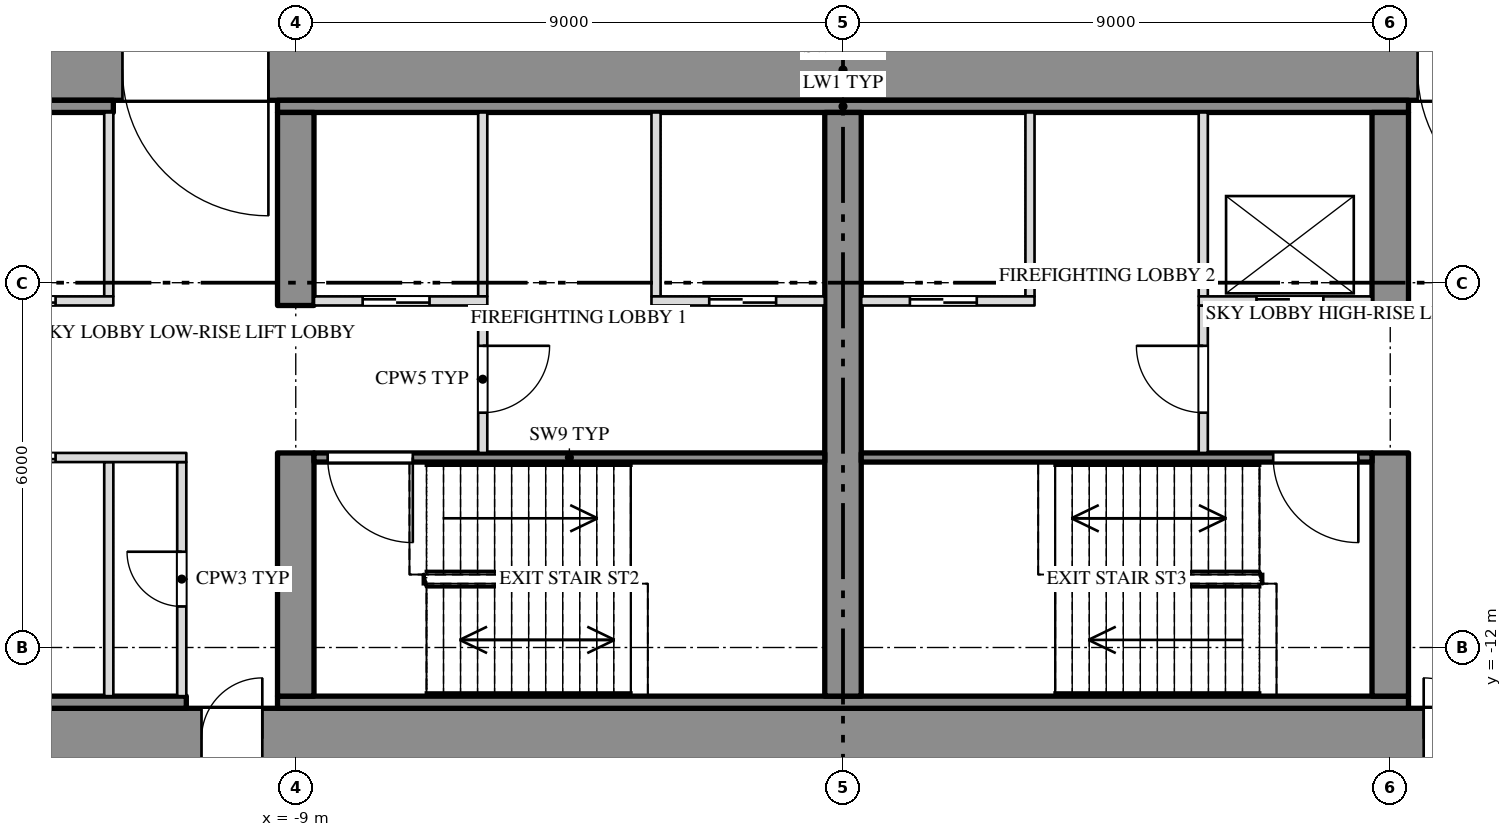
"""IFC4 building model, lengths in metres.
Left out: names, types, materials, properties, quantities, classifications, styles, units other than length and angle.
Written with IfcOpenShell. Run it as: python <this file> out.ifc"""

import sys

from ifc_helpers import new_model, si_unit, direction, frame, frame_2d, origin, place, context, subcontext, project, spatial, rectangle, extrude, element, fill, save


model = new_model("IFC4")
c1 = context("Model", 3, precision=1e-05, world=origin(), true_north=direction((0.0, 1.0)))
c2 = subcontext(c1, "Body", "Model", "MODEL_VIEW")
j1 = project(units=[si_unit("LENGTHUNIT", "METRE"), si_unit("PLANEANGLEUNIT", "RADIAN")], contexts=[c1])
p1 = place(None, origin())
s1 = spatial("IfcSite", under=j1, at=p1, CompositionType="ELEMENT")
p2 = place(p1, origin())
s2 = spatial("IfcBuilding", under=s1, at=p2, CompositionType="ELEMENT")
p3 = place(p2, frame((0.0, 0.0, 156.5)))
s3 = spatial("IfcBuildingStorey", under=s2, at=p3, CompositionType="ELEMENT", Elevation=156.5)
p4 = place(p3, frame((-27.0, -2.5, 0.0), z_axis=(0.0, 0.0, 1.0), x_axis=(1.0, 0.0, 0.0)))
e1 = element("IfcWall", 1, at=p4, inside=s3, PredefinedType="SHEAR", context=c2, shape_type="SweptSolid", body=[
    extrude(rectangle(XDim=54.0, YDim=1.0, at=frame_2d((27.0, 0.0))), origin(), (0.0, 0.0, 1.0), 3.65),
])
p5 = place(p4, frame((15.15, 0.0, 0.0)))
e2 = element("IfcOpeningElement", 2, at=p5, cuts=e1, PredefinedType="OPENING", context=c2, shape_type="SweptSolid", body=[
    extrude(rectangle(XDim=2.4, YDim=2.1, at=frame_2d((1.2, 1.05))), frame((0.0, 0.512, 0.0), z_axis=(0.0, -1.0, 0.0), x_axis=(1.0, 0.0, 0.0)), (0.0, 0.0, 1.0), 1.024),
])
p6 = place(p4, frame((36.45, 0.0, 0.0)))
e3 = element("IfcOpeningElement", 3, at=p6, cuts=e1, PredefinedType="OPENING", context=c2, shape_type="SweptSolid", body=[
    extrude(rectangle(XDim=2.4, YDim=2.1, at=frame_2d((1.2, 1.05))), frame((0.0, 0.512, 0.0), z_axis=(0.0, -1.0, 0.0), x_axis=(1.0, 0.0, 0.0)), (0.0, 0.0, 1.0), 1.024),
])
p7 = place(p3, frame((-27.0, -13.5, 0.0), z_axis=(0.0, 0.0, 1.0), x_axis=(1.0, 0.0, 0.0)))
e4 = element("IfcWall", 4, at=p7, inside=s3, PredefinedType="SHEAR", context=c2, shape_type="SweptSolid", body=[
    extrude(rectangle(XDim=54.0, YDim=1.0, at=frame_2d((27.0, 0.0))), origin(), (0.0, 0.0, 1.0), 3.65),
])
p8 = place(p7, frame((16.45, 0.0, 0.0)))
e5 = element("IfcOpeningElement", 5, at=p8, cuts=e4, PredefinedType="OPENING", context=c2, shape_type="SweptSolid", body=[
    extrude(rectangle(XDim=1.0, YDim=2.1, at=frame_2d((0.5, 1.05))), frame((0.0, 0.512, 0.0), z_axis=(0.0, -1.0, 0.0), x_axis=(1.0, 0.0, 0.0)), (0.0, 0.0, 1.0), 1.024),
])
p9 = place(p7, frame((36.55, 0.0, 0.0)))
e6 = element("IfcOpeningElement", 6, at=p9, cuts=e4, PredefinedType="OPENING", context=c2, shape_type="SweptSolid", body=[
    extrude(rectangle(XDim=1.0, YDim=2.1, at=frame_2d((0.5, 1.05))), frame((0.0, 0.512, 0.0), z_axis=(0.0, -1.0, 0.0), x_axis=(1.0, 0.0, 0.0)), (0.0, 0.0, 1.0), 1.024),
])
p10 = place(p3, frame((-26.0, -3.1, 0.0), z_axis=(0.0, 0.0, 1.0), x_axis=(1.0, 0.0, 0.0)))
e7 = element("IfcWall", 7, at=p10, inside=s3, PredefinedType="SHEAR", context=c2, shape_type="SweptSolid", body=[
    extrude(rectangle(XDim=14.0, YDim=0.2, at=frame_2d((7.0, 0.0))), origin(), (0.0, 0.0, 1.0), 3.65),
])
p11 = place(p3, frame((-9.3, -3.1, 0.0), z_axis=(0.0, 0.0, 1.0), x_axis=(1.0, 0.0, 0.0)))
e8 = element("IfcWall", 8, at=p11, inside=s3, PredefinedType="SHEAR", context=c2, shape_type="SweptSolid", body=[
    extrude(rectangle(XDim=18.6, YDim=0.2, at=frame_2d((9.3, 0.0))), origin(), (0.0, 0.0, 1.0), 3.65),
])
p12 = place(p3, frame((-26.0, -12.9, 0.0), z_axis=(0.0, 0.0, 1.0), x_axis=(1.0, 0.0, 0.0)))
e9 = element("IfcWall", 9, at=p12, inside=s3, PredefinedType="SHEAR", context=c2, shape_type="SweptSolid", body=[
    extrude(rectangle(XDim=15.2, YDim=0.2, at=frame_2d((7.6, 0.0))), origin(), (0.0, 0.0, 1.0), 3.65),
])
p13 = place(p3, frame((-9.3, -12.9, 0.0), z_axis=(0.0, 0.0, 1.0), x_axis=(1.0, 0.0, 0.0)))
e10 = element("IfcWall", 10, at=p13, inside=s3, PredefinedType="SHEAR", context=c2, shape_type="SweptSolid", body=[
    extrude(rectangle(XDim=18.6, YDim=0.2, at=frame_2d((9.3, 0.0))), origin(), (0.0, 0.0, 1.0), 3.65),
])
p14 = place(p3, frame((-9.0, -12.8, 0.0), z_axis=(0.0, 0.0, 1.0), x_axis=(0.0, 1.0, 0.0)))
e11 = element("IfcWall", 11, at=p14, inside=s3, PredefinedType="SHEAR", context=c2, shape_type="SweptSolid", body=[
    extrude(rectangle(XDim=4.0, YDim=0.6, at=frame_2d((2.0, 0.0))), origin(), (0.0, 0.0, 1.0), 3.65),
])
p15 = place(p3, frame((-9.0, -6.375, 0.0), z_axis=(0.0, 0.0, 1.0), x_axis=(0.0, 1.0, 0.0)))
e12 = element("IfcWall", 12, at=p15, inside=s3, PredefinedType="SHEAR", context=c2, shape_type="SweptSolid", body=[
    extrude(rectangle(XDim=3.175, YDim=0.6, at=frame_2d((1.587, 0.0))), origin(), (0.0, 0.0, 1.0), 3.65),
])
p16 = place(p3, frame((0.0, -12.8, 0.0), z_axis=(0.0, 0.0, 1.0), x_axis=(0.0, 1.0, 0.0)))
e13 = element("IfcWall", 13, at=p16, inside=s3, PredefinedType="SHEAR", context=c2, shape_type="SweptSolid", body=[
    extrude(rectangle(XDim=9.6, YDim=0.6, at=frame_2d((4.8, 0.0))), origin(), (0.0, 0.0, 1.0), 3.65),
])
p17 = place(p3, frame((9.0, -12.8, 0.0), z_axis=(0.0, 0.0, 1.0), x_axis=(0.0, 1.0, 0.0)))
e14 = element("IfcWall", 14, at=p17, inside=s3, PredefinedType="SHEAR", context=c2, shape_type="SweptSolid", body=[
    extrude(rectangle(XDim=4.0, YDim=0.6, at=frame_2d((2.0, 0.0))), origin(), (0.0, 0.0, 1.0), 3.65),
])
p18 = place(p3, frame((9.0, -6.375, 0.0), z_axis=(0.0, 0.0, 1.0), x_axis=(0.0, 1.0, 0.0)))
e15 = element("IfcWall", 15, at=p18, inside=s3, PredefinedType="SHEAR", context=c2, shape_type="SweptSolid", body=[
    extrude(rectangle(XDim=3.175, YDim=0.6, at=frame_2d((1.587, 0.0))), origin(), (0.0, 0.0, 1.0), 3.65),
])
for number, where, z_axis, x_axis in (
    (16, (-12.075, -6.225, 0.0), (0.0, 0.0, 1.0), (0.0, 1.0, 0.0)),
    (17, (-3.075, -6.225, 0.0), (0.0, 0.0, 1.0), (0.0, 1.0, 0.0)),
    (18, (-5.925, -6.225, 0.0), (0.0, 0.0, 1.0), (0.0, 1.0, 0.0)),
    (19, (3.075, -6.225, 0.0), (0.0, 0.0, 1.0), (0.0, 1.0, 0.0)),
    (20, (5.925, -6.225, 0.0), (0.0, 0.0, 1.0), (0.0, 1.0, 0.0)),
):
    element("IfcWall", number, at=place(p3, frame(where, z_axis=z_axis, x_axis=x_axis)), inside=s3, PredefinedType="PARTITIONING", context=c2, shape_type="SweptSolid", body=[
        extrude(rectangle(XDim=3.025, YDim=0.15, at=frame_2d((1.513, 0.0))), origin(), (0.0, 0.0, 1.0), 3.65),
    ])
p19 = place(p3, frame((-10.875, -12.8, 0.0), z_axis=(0.0, 0.0, 1.0), x_axis=(0.0, 1.0, 0.0)))
e21 = element("IfcWall", 21, at=p19, inside=s3, PredefinedType="PARTITIONING", context=c2, shape_type="SweptSolid", body=[
    extrude(rectangle(XDim=3.85, YDim=0.15, at=frame_2d((1.925, 0.0))), origin(), (0.0, 0.0, 1.0), 3.65),
])
p20 = place(p19, frame((1.475, 0.0, 0.0)))
e22 = element("IfcOpeningElement", 22, at=p20, cuts=e21, PredefinedType="OPENING", context=c2, shape_type="SweptSolid", body=[
    extrude(rectangle(XDim=0.9, YDim=2.1, at=frame_2d((0.45, 1.05))), frame((0.0, 0.087, 0.0), z_axis=(0.0, -1.0, 0.0), x_axis=(1.0, 0.0, 0.0)), (0.0, 0.0, 1.0), 0.174),
])
p21 = place(p3, frame((-12.075, -12.8, 0.0), z_axis=(0.0, 0.0, 1.0), x_axis=(0.0, 1.0, 0.0)))
e23 = element("IfcWall", 23, at=p21, inside=s3, PredefinedType="PARTITIONING", context=c2, shape_type="SweptSolid", body=[
    extrude(rectangle(XDim=3.85, YDim=0.15, at=frame_2d((1.925, 0.0))), origin(), (0.0, 0.0, 1.0), 3.65),
])
p22 = place(p3, frame((-5.925, -8.8, 0.0), z_axis=(0.0, 0.0, 1.0), x_axis=(0.0, 1.0, 0.0)))
e24 = element("IfcWall", 24, at=p22, inside=s3, PredefinedType="PARTITIONING", context=c2, shape_type="SweptSolid", body=[
    extrude(rectangle(XDim=2.425, YDim=0.15, at=frame_2d((1.212, 0.0))), origin(), (0.0, 0.0, 1.0), 3.65),
])
p23 = place(p22, frame((0.662, 0.0, 0.0)))
e25 = element("IfcOpeningElement", 25, at=p23, cuts=e24, PredefinedType="OPENING", context=c2, shape_type="SweptSolid", body=[
    extrude(rectangle(XDim=1.1, YDim=2.1, at=frame_2d((0.55, 1.05))), frame((0.0, 0.087, 0.0), z_axis=(0.0, -1.0, 0.0), x_axis=(1.0, 0.0, 0.0)), (0.0, 0.0, 1.0), 0.174),
])
p24 = place(p3, frame((5.925, -8.8, 0.0), z_axis=(0.0, 0.0, 1.0), x_axis=(0.0, 1.0, 0.0)))
e26 = element("IfcWall", 26, at=p24, inside=s3, PredefinedType="PARTITIONING", context=c2, shape_type="SweptSolid", body=[
    extrude(rectangle(XDim=2.425, YDim=0.15, at=frame_2d((1.212, 0.0))), origin(), (0.0, 0.0, 1.0), 3.65),
])
p25 = place(p24, frame((0.662, 0.0, 0.0)))
e27 = element("IfcOpeningElement", 27, at=p25, cuts=e26, PredefinedType="OPENING", context=c2, shape_type="SweptSolid", body=[
    extrude(rectangle(XDim=1.1, YDim=2.1, at=frame_2d((0.55, 1.05))), frame((0.0, 0.087, 0.0), z_axis=(0.0, -1.0, 0.0), x_axis=(1.0, 0.0, 0.0)), (0.0, 0.0, 1.0), 0.174),
])
p26 = place(p3, frame((-17.7, -6.3, 0.0), z_axis=(0.0, 0.0, 1.0), x_axis=(1.0, 0.0, 0.0)))
e28 = element("IfcWall", 28, at=p26, inside=s3, PredefinedType="PARTITIONING", context=c2, shape_type="SweptSolid", body=[
    extrude(rectangle(XDim=5.7, YDim=0.15, at=frame_2d((2.85, 0.0))), origin(), (0.0, 0.0, 1.0), 3.65),
])
p27 = place(p26, frame((0.8, 0.0, 0.0)))
e29 = element("IfcOpeningElement", 29, at=p27, cuts=e28, PredefinedType="OPENING", context=c2, shape_type="SweptSolid", body=[
    extrude(rectangle(XDim=1.1, YDim=2.1, at=frame_2d((0.55, 1.05))), frame((0.0, 0.087, 0.0), z_axis=(0.0, -1.0, 0.0), x_axis=(1.0, 0.0, 0.0)), (0.0, 0.0, 1.0), 0.174),
])
p28 = place(p26, frame((3.65, 0.0, 0.0)))
e30 = element("IfcOpeningElement", 30, at=p28, cuts=e28, PredefinedType="OPENING", context=c2, shape_type="SweptSolid", body=[
    extrude(rectangle(XDim=1.1, YDim=2.1, at=frame_2d((0.55, 1.05))), frame((0.0, 0.087, 0.0), z_axis=(0.0, -1.0, 0.0), x_axis=(1.0, 0.0, 0.0)), (0.0, 0.0, 1.0), 0.174),
])
p29 = place(p3, frame((-8.7, -6.3, 0.0), z_axis=(0.0, 0.0, 1.0), x_axis=(1.0, 0.0, 0.0)))
e31 = element("IfcWall", 31, at=p29, inside=s3, PredefinedType="PARTITIONING", context=c2, shape_type="SweptSolid", body=[
    extrude(rectangle(XDim=2.85, YDim=0.15, at=frame_2d((1.425, 0.0))), origin(), (0.0, 0.0, 1.0), 3.65),
])
p30 = place(p29, frame((0.8, 0.0, 0.0)))
e32 = element("IfcOpeningElement", 32, at=p30, cuts=e31, PredefinedType="OPENING", context=c2, shape_type="SweptSolid", body=[
    extrude(rectangle(XDim=1.1, YDim=2.1, at=frame_2d((0.55, 1.05))), frame((0.0, 0.087, 0.0), z_axis=(0.0, -1.0, 0.0), x_axis=(1.0, 0.0, 0.0)), (0.0, 0.0, 1.0), 0.174),
])
p31 = place(p3, frame((-3.15, -6.3, 0.0), z_axis=(0.0, 0.0, 1.0), x_axis=(1.0, 0.0, 0.0)))
e33 = element("IfcWall", 33, at=p31, inside=s3, PredefinedType="PARTITIONING", context=c2, shape_type="SweptSolid", body=[
    extrude(rectangle(XDim=2.85, YDim=0.15, at=frame_2d((1.425, 0.0))), origin(), (0.0, 0.0, 1.0), 3.65),
])
p32 = place(p31, frame((0.95, 0.0, 0.0)))
e34 = element("IfcOpeningElement", 34, at=p32, cuts=e33, PredefinedType="OPENING", context=c2, shape_type="SweptSolid", body=[
    extrude(rectangle(XDim=1.1, YDim=2.1, at=frame_2d((0.55, 1.05))), frame((0.0, 0.087, 0.0), z_axis=(0.0, -1.0, 0.0), x_axis=(1.0, 0.0, 0.0)), (0.0, 0.0, 1.0), 0.174),
])
p33 = place(p3, frame((0.3, -6.3, 0.0), z_axis=(0.0, 0.0, 1.0), x_axis=(1.0, 0.0, 0.0)))
e35 = element("IfcWall", 35, at=p33, inside=s3, PredefinedType="PARTITIONING", context=c2, shape_type="SweptSolid", body=[
    extrude(rectangle(XDim=2.85, YDim=0.15, at=frame_2d((1.425, 0.0))), origin(), (0.0, 0.0, 1.0), 3.65),
])
p34 = place(p33, frame((0.8, 0.0, 0.0)))
e36 = element("IfcOpeningElement", 36, at=p34, cuts=e35, PredefinedType="OPENING", context=c2, shape_type="SweptSolid", body=[
    extrude(rectangle(XDim=1.1, YDim=2.1, at=frame_2d((0.55, 1.05))), frame((0.0, 0.087, 0.0), z_axis=(0.0, -1.0, 0.0), x_axis=(1.0, 0.0, 0.0)), (0.0, 0.0, 1.0), 0.174),
])
p35 = place(p3, frame((5.85, -6.3, 0.0), z_axis=(0.0, 0.0, 1.0), x_axis=(1.0, 0.0, 0.0)))
e37 = element("IfcWall", 37, at=p35, inside=s3, PredefinedType="PARTITIONING", context=c2, shape_type="SweptSolid", body=[
    extrude(rectangle(XDim=2.85, YDim=0.15, at=frame_2d((1.425, 0.0))), origin(), (0.0, 0.0, 1.0), 3.65),
])
p36 = place(p35, frame((0.95, 0.0, 0.0)))
e38 = element("IfcOpeningElement", 38, at=p36, cuts=e37, PredefinedType="OPENING", context=c2, shape_type="SweptSolid", body=[
    extrude(rectangle(XDim=1.1, YDim=2.1, at=frame_2d((0.55, 1.05))), frame((0.0, 0.087, 0.0), z_axis=(0.0, -1.0, 0.0), x_axis=(1.0, 0.0, 0.0)), (0.0, 0.0, 1.0), 0.174),
])
p37 = place(p3, frame((-17.7, -8.875, 0.0), z_axis=(0.0, 0.0, 1.0), x_axis=(1.0, 0.0, 0.0)))
e39 = element("IfcWall", 39, at=p37, inside=s3, PredefinedType="PARTITIONING", context=c2, shape_type="SweptSolid", body=[
    extrude(rectangle(XDim=6.9, YDim=0.15, at=frame_2d((3.45, 0.0))), origin(), (0.0, 0.0, 1.0), 3.65),
])
p38 = place(p37, frame((0.8, 0.0, 0.0)))
e40 = element("IfcOpeningElement", 40, at=p38, cuts=e39, PredefinedType="OPENING", context=c2, shape_type="SweptSolid", body=[
    extrude(rectangle(XDim=1.1, YDim=2.1, at=frame_2d((0.55, 1.05))), frame((0.0, 0.087, 0.0), z_axis=(0.0, -1.0, 0.0), x_axis=(1.0, 0.0, 0.0)), (0.0, 0.0, 1.0), 0.174),
])
p39 = place(p37, frame((3.65, 0.0, 0.0)))
e41 = element("IfcOpeningElement", 41, at=p39, cuts=e39, PredefinedType="OPENING", context=c2, shape_type="SweptSolid", body=[
    extrude(rectangle(XDim=1.1, YDim=2.1, at=frame_2d((0.55, 1.05))), frame((0.0, 0.087, 0.0), z_axis=(0.0, -1.0, 0.0), x_axis=(1.0, 0.0, 0.0)), (0.0, 0.0, 1.0), 0.174),
])
p40 = place(p3, frame((-8.7, -8.875, 0.0), z_axis=(0.0, 0.0, 1.0), x_axis=(1.0, 0.0, 0.0)))
e42 = element("IfcWall", 42, at=p40, inside=s3, PredefinedType="SHEAR", context=c2, shape_type="SweptSolid", body=[
    extrude(rectangle(XDim=8.4, YDim=0.15, at=frame_2d((4.2, 0.0))), origin(), (0.0, 0.0, 1.0), 3.65),
])
p41 = place(p40, frame((0.225, 0.0, 0.0)))
e43 = element("IfcOpeningElement", 43, at=p41, cuts=e42, PredefinedType="OPENING", context=c2, shape_type="SweptSolid", body=[
    extrude(rectangle(XDim=1.4, YDim=2.1, at=frame_2d((0.7, 1.05))), frame((0.0, 0.087, 0.0), z_axis=(0.0, -1.0, 0.0), x_axis=(1.0, 0.0, 0.0)), (0.0, 0.0, 1.0), 0.174),
])
p42 = place(p3, frame((0.3, -8.875, 0.0), z_axis=(0.0, 0.0, 1.0), x_axis=(1.0, 0.0, 0.0)))
e44 = element("IfcWall", 44, at=p42, inside=s3, PredefinedType="SHEAR", context=c2, shape_type="SweptSolid", body=[
    extrude(rectangle(XDim=8.4, YDim=0.15, at=frame_2d((4.2, 0.0))), origin(), (0.0, 0.0, 1.0), 3.65),
])
p43 = place(p42, frame((6.775, 0.0, 0.0)))
e45 = element("IfcOpeningElement", 45, at=p43, cuts=e44, PredefinedType="OPENING", context=c2, shape_type="SweptSolid", body=[
    extrude(rectangle(XDim=1.4, YDim=2.1, at=frame_2d((0.7, 1.05))), frame((0.0, 0.087, 0.0), z_axis=(0.0, -1.0, 0.0), x_axis=(1.0, 0.0, 0.0)), (0.0, 0.0, 1.0), 0.174),
])
p44 = place(p39, origin())
e46 = element("IfcDoor", 46, at=p44, inside=s3, OperationType="SLIDING_TO_RIGHT", PredefinedType="DOOR", context=c2, shape_type="SweptSolid", body=[
    extrude(rectangle(XDim=1.1, YDim=2.1, at=frame_2d((0.55, 1.05))), frame((0.0, 0.025, 0.0), z_axis=(0.0, -1.0, 0.0), x_axis=(1.0, 0.0, 0.0)), (0.0, 0.0, 1.0), 0.05),
])
fill(e41, e46)
p45 = place(p28, origin())
e47 = element("IfcDoor", 47, at=p45, inside=s3, OperationType="SLIDING_TO_LEFT", PredefinedType="DOOR", context=c2, shape_type="SweptSolid", body=[
    extrude(rectangle(XDim=1.1, YDim=2.1, at=frame_2d((0.55, 1.05))), frame((0.0, 0.025, 0.0), z_axis=(0.0, -1.0, 0.0), x_axis=(1.0, 0.0, 0.0)), (0.0, 0.0, 1.0), 0.05),
])
fill(e30, e47)
p46 = place(p20, origin())
e48 = element("IfcDoor", 48, at=p46, inside=s3, OperationType="SINGLE_SWING_RIGHT", PredefinedType="DOOR", context=c2, shape_type="SweptSolid", body=[
    extrude(rectangle(XDim=0.9, YDim=2.1, at=frame_2d((0.45, 1.05))), frame((0.0, 0.025, 0.0), z_axis=(0.0, -1.0, 0.0), x_axis=(1.0, 0.0, 0.0)), (0.0, 0.0, 1.0), 0.05),
])
fill(e22, e48)
p47 = place(p5, origin())
e49 = element("IfcDoor", 49, at=p47, inside=s3, OperationType="DOUBLE_DOOR_SINGLE_SWING", PredefinedType="DOOR", context=c2, shape_type="SweptSolid", body=[
    extrude(rectangle(XDim=2.4, YDim=2.1, at=frame_2d((1.2, 1.05))), frame((0.0, 0.025, 0.0), z_axis=(0.0, -1.0, 0.0), x_axis=(1.0, 0.0, 0.0)), (0.0, 0.0, 1.0), 0.05),
])
fill(e2, e49)
p48 = place(p8, origin())
e50 = element("IfcDoor", 50, at=p48, inside=s3, OperationType="SINGLE_SWING_RIGHT", PredefinedType="DOOR", context=c2, shape_type="SweptSolid", body=[
    extrude(rectangle(XDim=1.0, YDim=2.1, at=frame_2d((0.5, 1.05))), frame((0.0, 0.025, 0.0), z_axis=(0.0, -1.0, 0.0), x_axis=(1.0, 0.0, 0.0)), (0.0, 0.0, 1.0), 0.05),
])
fill(e5, e50)
p49 = place(p41, origin())
e51 = element("IfcDoor", 51, at=p49, inside=s3, OperationType="DOUBLE_DOOR_SINGLE_SWING", PredefinedType="DOOR", context=c2, shape_type="SweptSolid", body=[
    extrude(rectangle(XDim=1.4, YDim=2.1, at=frame_2d((0.7, 1.05))), frame((0.0, 0.025, 0.0), z_axis=(0.0, -1.0, 0.0), x_axis=(1.0, 0.0, 0.0)), (0.0, 0.0, 1.0), 0.05),
])
fill(e43, e51)
p50 = place(p30, origin())
e52 = element("IfcDoor", 52, at=p50, inside=s3, OperationType="SLIDING_TO_RIGHT", PredefinedType="DOOR", context=c2, shape_type="SweptSolid", body=[
    extrude(rectangle(XDim=1.1, YDim=2.1, at=frame_2d((0.55, 1.05))), frame((0.0, 0.025, 0.0), z_axis=(0.0, -1.0, 0.0), x_axis=(1.0, 0.0, 0.0)), (0.0, 0.0, 1.0), 0.05),
])
fill(e32, e52)
p51 = place(p23, origin())
e53 = element("IfcDoor", 53, at=p51, inside=s3, OperationType="SINGLE_SWING_LEFT", PredefinedType="DOOR", context=c2, shape_type="SweptSolid", body=[
    extrude(rectangle(XDim=1.1, YDim=2.1, at=frame_2d((0.55, 1.05))), frame((0.0, 0.025, 0.0), z_axis=(0.0, -1.0, 0.0), x_axis=(1.0, 0.0, 0.0)), (0.0, 0.0, 1.0), 0.05),
])
fill(e25, e53)
p52 = place(p32, origin())
e54 = element("IfcDoor", 54, at=p52, inside=s3, OperationType="SLIDING_TO_RIGHT", PredefinedType="DOOR", context=c2, shape_type="SweptSolid", body=[
    extrude(rectangle(XDim=1.1, YDim=2.1, at=frame_2d((0.55, 1.05))), frame((0.0, 0.025, 0.0), z_axis=(0.0, -1.0, 0.0), x_axis=(1.0, 0.0, 0.0)), (0.0, 0.0, 1.0), 0.05),
])
fill(e34, e54)
p53 = place(p34, origin())
e55 = element("IfcDoor", 55, at=p53, inside=s3, OperationType="SLIDING_TO_LEFT", PredefinedType="DOOR", context=c2, shape_type="SweptSolid", body=[
    extrude(rectangle(XDim=1.1, YDim=2.1, at=frame_2d((0.55, 1.05))), frame((0.0, 0.025, 0.0), z_axis=(0.0, -1.0, 0.0), x_axis=(1.0, 0.0, 0.0)), (0.0, 0.0, 1.0), 0.05),
])
fill(e36, e55)
p54 = place(p25, origin())
e56 = element("IfcDoor", 56, at=p54, inside=s3, OperationType="SINGLE_SWING_RIGHT", PredefinedType="DOOR", context=c2, shape_type="SweptSolid", body=[
    extrude(rectangle(XDim=1.1, YDim=2.1, at=frame_2d((0.55, 1.05))), frame((0.0, 0.025, 0.0), z_axis=(0.0, -1.0, 0.0), x_axis=(1.0, 0.0, 0.0)), (0.0, 0.0, 1.0), 0.05),
])
fill(e27, e56)
p55 = place(p36, origin())
e57 = element("IfcDoor", 57, at=p55, inside=s3, OperationType="SLIDING_TO_LEFT", PredefinedType="DOOR", context=c2, shape_type="SweptSolid", body=[
    extrude(rectangle(XDim=1.1, YDim=2.1, at=frame_2d((0.55, 1.05))), frame((0.0, 0.025, 0.0), z_axis=(0.0, -1.0, 0.0), x_axis=(1.0, 0.0, 0.0)), (0.0, 0.0, 1.0), 0.05),
])
fill(e38, e57)
p56 = place(p43, origin())
e58 = element("IfcDoor", 58, at=p56, inside=s3, OperationType="DOUBLE_DOOR_SINGLE_SWING", PredefinedType="DOOR", context=c2, shape_type="SweptSolid", body=[
    extrude(rectangle(XDim=1.4, YDim=2.1, at=frame_2d((0.7, 1.05))), frame((0.0, 0.025, 0.0), z_axis=(0.0, -1.0, 0.0), x_axis=(1.0, 0.0, 0.0)), (0.0, 0.0, 1.0), 0.05),
])
fill(e45, e58)
p57 = place(p9, origin())
e59 = element("IfcDoor", 59, at=p57, inside=s3, OperationType="SINGLE_SWING_LEFT", PredefinedType="DOOR", context=c2, shape_type="SweptSolid", body=[
    extrude(rectangle(XDim=1.0, YDim=2.1, at=frame_2d((0.5, 1.05))), frame((0.0, 0.025, 0.0), z_axis=(0.0, -1.0, 0.0), x_axis=(1.0, 0.0, 0.0)), (0.0, 0.0, 1.0), 0.05),
])
fill(e6, e59)
p58 = place(p6, origin())
e60 = element("IfcDoor", 60, at=p58, inside=s3, OperationType="DOUBLE_DOOR_SINGLE_SWING", PredefinedType="DOOR", context=c2, shape_type="SweptSolid", body=[
    extrude(rectangle(XDim=2.4, YDim=2.1, at=frame_2d((1.2, 1.05))), frame((0.0, 0.025, 0.0), z_axis=(0.0, -1.0, 0.0), x_axis=(1.0, 0.0, 0.0)), (0.0, 0.0, 1.0), 0.05),
])
fill(e3, e60)
save(model, sys.argv[1])
